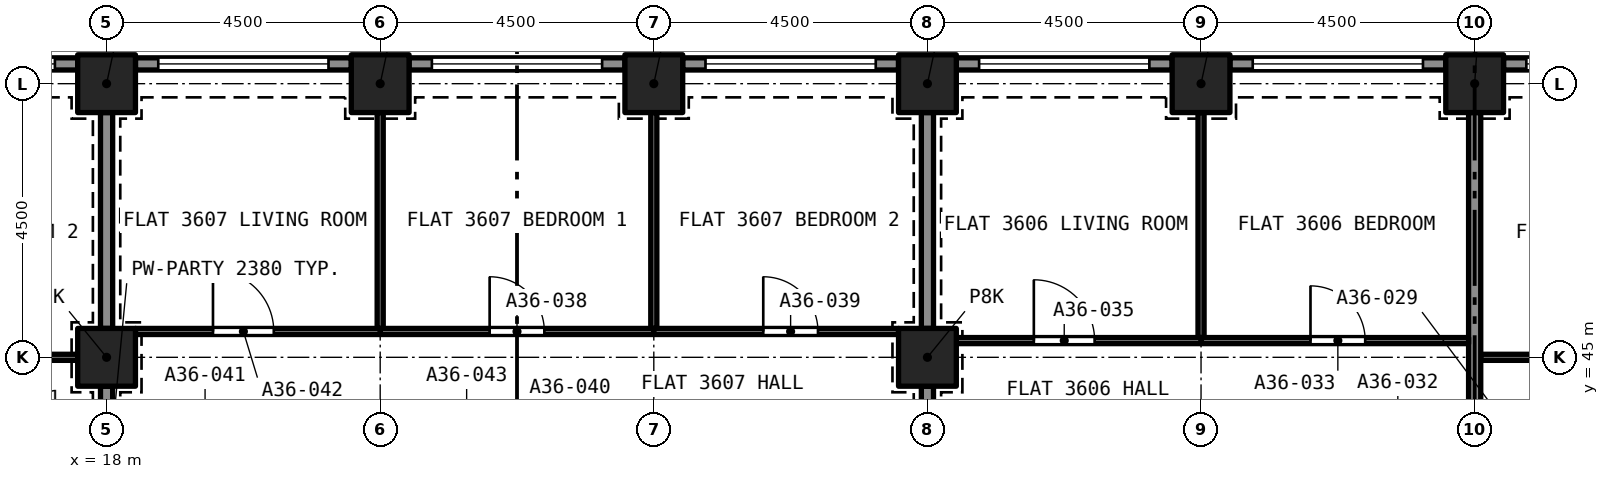
"""IFC4 building model, lengths in metres.
Left out: names, types, materials, properties, quantities, classifications, styles, units other than length and angle.
Written with IfcOpenShell. Run it as: python <this file> out.ifc"""

import sys

from ifc_helpers import new_model, si_unit, direction, frame, frame_2d, origin, origin_2d, place, context, subcontext, project, spatial, rectangle, extrude, element, fill, save


model = new_model("IFC4")
c1 = context("Model", 3, precision=1e-05, world=origin(), true_north=direction((0.0, 1.0)))
c2 = subcontext(c1, "Body", "Model", "MODEL_VIEW")
j1 = project(units=[si_unit("LENGTHUNIT", "METRE"), si_unit("PLANEANGLEUNIT", "RADIAN")], contexts=[c1])
p1 = place(None, origin())
s1 = spatial("IfcSite", under=j1, at=p1, CompositionType="ELEMENT")
p2 = place(p1, origin())
s2 = spatial("IfcBuilding", under=s1, at=p2, CompositionType="ELEMENT")
p3 = place(p2, frame((0.0, 0.0, 130.2)))
s3 = spatial("IfcBuildingStorey", under=s2, at=p3, CompositionType="ELEMENT", Elevation=130.2)
for number, where, z_axis, x_axis in (
    (1, (18.0, 45.0, 0.0), (0.0, 0.0, 1.0), (1.0, 0.0, 0.0)),
    (2, (31.5, 45.0, 0.0), (0.0, 0.0, 1.0), (1.0, 0.0, 0.0)),
    (3, (18.0, 49.5, 0.0), (0.0, 0.0, 1.0), (1.0, 0.0, 0.0)),
    (4, (22.5, 49.5, 0.0), (0.0, 0.0, 1.0), (1.0, 0.0, 0.0)),
    (5, (27.0, 49.5, 0.0), (0.0, 0.0, 1.0), (1.0, 0.0, 0.0)),
    (6, (31.5, 49.5, 0.0), (0.0, 0.0, 1.0), (1.0, 0.0, 0.0)),
    (7, (36.0, 49.5, 0.0), (0.0, 0.0, 1.0), (1.0, 0.0, 0.0)),
    (8, (40.5, 49.5, 0.0), (0.0, 0.0, 1.0), (1.0, 0.0, 0.0)),
):
    element("IfcColumn", number, at=place(p3, frame(where, z_axis=z_axis, x_axis=x_axis)), inside=s3, PredefinedType="COLUMN", context=c2, shape_type="SweptSolid", body=[
        extrude(rectangle(XDim=0.95, YDim=0.95, at=origin_2d()), origin(), (0.0, 0.0, 1.0), 3.2),
    ])
p4 = place(p3, frame((40.975, 49.825, 0.0), z_axis=(0.0, 0.0, 1.0), x_axis=(1.0, 0.0, 0.0)))
e9 = element("IfcWall", 9, at=p4, inside=s3, PredefinedType="SOLIDWALL", context=c2, shape_type="SweptSolid", body=[
    extrude(rectangle(XDim=3.55, YDim=0.2, at=frame_2d((1.775, 0.0))), origin(), (0.0, 0.0, 1.0), 3.2),
])
p5 = place(p4, frame((0.375, 0.0, 0.45)))
e10 = element("IfcOpeningElement", 10, at=p5, cuts=e9, PredefinedType="OPENING", context=c2, shape_type="SweptSolid", body=[
    extrude(rectangle(XDim=2.8, YDim=1.95, at=frame_2d((1.4, 0.975))), frame((0.0, 0.11, 0.0), z_axis=(0.0, -1.0, 0.0), x_axis=(1.0, 0.0, 0.0)), (0.0, 0.0, 1.0), 0.22),
])
p6 = place(p3, frame((36.475, 49.825, 0.0), z_axis=(0.0, 0.0, 1.0), x_axis=(1.0, 0.0, 0.0)))
e11 = element("IfcWall", 11, at=p6, inside=s3, PredefinedType="SOLIDWALL", context=c2, shape_type="SweptSolid", body=[
    extrude(rectangle(XDim=3.55, YDim=0.2, at=frame_2d((1.775, 0.0))), origin(), (0.0, 0.0, 1.0), 3.2),
])
p7 = place(p6, frame((0.375, 0.0, 0.45)))
e12 = element("IfcOpeningElement", 12, at=p7, cuts=e11, PredefinedType="OPENING", context=c2, shape_type="SweptSolid", body=[
    extrude(rectangle(XDim=2.8, YDim=1.95, at=frame_2d((1.4, 0.975))), frame((0.0, 0.11, 0.0), z_axis=(0.0, -1.0, 0.0), x_axis=(1.0, 0.0, 0.0)), (0.0, 0.0, 1.0), 0.22),
])
p8 = place(p3, frame((31.975, 49.825, 0.0), z_axis=(0.0, 0.0, 1.0), x_axis=(1.0, 0.0, 0.0)))
e13 = element("IfcWall", 13, at=p8, inside=s3, PredefinedType="SOLIDWALL", context=c2, shape_type="SweptSolid", body=[
    extrude(rectangle(XDim=3.55, YDim=0.2, at=frame_2d((1.775, 0.0))), origin(), (0.0, 0.0, 1.0), 3.2),
])
p9 = place(p8, frame((0.375, 0.0, 0.45)))
e14 = element("IfcOpeningElement", 14, at=p9, cuts=e13, PredefinedType="OPENING", context=c2, shape_type="SweptSolid", body=[
    extrude(rectangle(XDim=2.8, YDim=1.95, at=frame_2d((1.4, 0.975))), frame((0.0, 0.11, 0.0), z_axis=(0.0, -1.0, 0.0), x_axis=(1.0, 0.0, 0.0)), (0.0, 0.0, 1.0), 0.22),
])
p10 = place(p3, frame((27.475, 49.825, 0.0), z_axis=(0.0, 0.0, 1.0), x_axis=(1.0, 0.0, 0.0)))
e15 = element("IfcWall", 15, at=p10, inside=s3, PredefinedType="SOLIDWALL", context=c2, shape_type="SweptSolid", body=[
    extrude(rectangle(XDim=3.55, YDim=0.2, at=frame_2d((1.775, 0.0))), origin(), (0.0, 0.0, 1.0), 3.2),
])
p11 = place(p10, frame((0.375, 0.0, 0.45)))
e16 = element("IfcOpeningElement", 16, at=p11, cuts=e15, PredefinedType="OPENING", context=c2, shape_type="SweptSolid", body=[
    extrude(rectangle(XDim=2.8, YDim=1.95, at=frame_2d((1.4, 0.975))), frame((0.0, 0.11, 0.0), z_axis=(0.0, -1.0, 0.0), x_axis=(1.0, 0.0, 0.0)), (0.0, 0.0, 1.0), 0.22),
])
p12 = place(p3, frame((22.975, 49.825, 0.0), z_axis=(0.0, 0.0, 1.0), x_axis=(1.0, 0.0, 0.0)))
e17 = element("IfcWall", 17, at=p12, inside=s3, PredefinedType="SOLIDWALL", context=c2, shape_type="SweptSolid", body=[
    extrude(rectangle(XDim=3.55, YDim=0.2, at=frame_2d((1.775, 0.0))), origin(), (0.0, 0.0, 1.0), 3.2),
])
p13 = place(p12, frame((0.375, 0.0, 0.45)))
e18 = element("IfcOpeningElement", 18, at=p13, cuts=e17, PredefinedType="OPENING", context=c2, shape_type="SweptSolid", body=[
    extrude(rectangle(XDim=2.8, YDim=1.95, at=frame_2d((1.4, 0.975))), frame((0.0, 0.11, 0.0), z_axis=(0.0, -1.0, 0.0), x_axis=(1.0, 0.0, 0.0)), (0.0, 0.0, 1.0), 0.22),
])
p14 = place(p3, frame((18.475, 49.825, 0.0), z_axis=(0.0, 0.0, 1.0), x_axis=(1.0, 0.0, 0.0)))
e19 = element("IfcWall", 19, at=p14, inside=s3, PredefinedType="SOLIDWALL", context=c2, shape_type="SweptSolid", body=[
    extrude(rectangle(XDim=3.55, YDim=0.2, at=frame_2d((1.775, 0.0))), origin(), (0.0, 0.0, 1.0), 3.2),
])
p15 = place(p14, frame((0.375, 0.0, 0.45)))
e20 = element("IfcOpeningElement", 20, at=p15, cuts=e19, PredefinedType="OPENING", context=c2, shape_type="SweptSolid", body=[
    extrude(rectangle(XDim=2.8, YDim=1.95, at=frame_2d((1.4, 0.975))), frame((0.0, 0.11, 0.0), z_axis=(0.0, -1.0, 0.0), x_axis=(1.0, 0.0, 0.0)), (0.0, 0.0, 1.0), 0.22),
])
p16 = place(p3, frame((13.975, 49.825, 0.0), z_axis=(0.0, 0.0, 1.0), x_axis=(1.0, 0.0, 0.0)))
e21 = element("IfcWall", 21, at=p16, inside=s3, PredefinedType="SOLIDWALL", context=c2, shape_type="SweptSolid", body=[
    extrude(rectangle(XDim=3.55, YDim=0.2, at=frame_2d((1.775, 0.0))), origin(), (0.0, 0.0, 1.0), 3.2),
])
p17 = place(p16, frame((0.375, 0.0, 0.45)))
e22 = element("IfcOpeningElement", 22, at=p17, cuts=e21, PredefinedType="OPENING", context=c2, shape_type="SweptSolid", body=[
    extrude(rectangle(XDim=2.8, YDim=1.95, at=frame_2d((1.4, 0.975))), frame((0.0, 0.11, 0.0), z_axis=(0.0, -1.0, 0.0), x_axis=(1.0, 0.0, 0.0)), (0.0, 0.0, 1.0), 0.22),
])
p18 = place(p3, frame((18.0, 40.975, 0.0), z_axis=(0.0, 0.0, 1.0), x_axis=(0.0, 1.0, 0.0)))
e23 = element("IfcWall", 23, at=p18, inside=s3, PredefinedType="PARTITIONING", context=c2, shape_type="SweptSolid", body=[
    extrude(rectangle(XDim=3.55, YDim=0.2, at=frame_2d((1.775, 0.0))), origin(), (0.0, 0.0, 1.0), 2.38),
])
p19 = place(p3, frame((13.5, 45.0, 0.0), z_axis=(0.0, 0.0, 1.0), x_axis=(1.0, 0.0, 0.0)))
e24 = element("IfcWall", 24, at=p19, inside=s3, PredefinedType="PARTITIONING", context=c2, shape_type="SweptSolid", body=[
    extrude(rectangle(XDim=4.025, YDim=0.1, at=frame_2d((2.012, 0.0))), origin(), (0.0, 0.0, 1.0), 2.9),
])
p20 = place(p19, frame((1.8, 0.0, 0.0)))
e25 = element("IfcOpeningElement", 25, at=p20, cuts=e24, PredefinedType="OPENING", context=c2, shape_type="SweptSolid", body=[
    extrude(rectangle(XDim=0.9, YDim=2.1, at=frame_2d((0.45, 1.05))), frame((0.0, 0.06, 0.0), z_axis=(0.0, -1.0, 0.0), x_axis=(1.0, 0.0, 0.0)), (0.0, 0.0, 1.0), 0.12),
])
p21 = place(p3, frame((18.0, 45.475, 0.0), z_axis=(0.0, 0.0, 1.0), x_axis=(0.0, 1.0, 0.0)))
e26 = element("IfcWall", 26, at=p21, inside=s3, PredefinedType="PARTITIONING", context=c2, shape_type="SweptSolid", body=[
    extrude(rectangle(XDim=3.55, YDim=0.2, at=frame_2d((1.775, 0.0))), origin(), (0.0, 0.0, 1.0), 2.38),
])
p22 = place(p3, frame((40.6, 45.0, 0.0), z_axis=(0.0, 0.0, 1.0), x_axis=(1.0, 0.0, 0.0)))
e27 = element("IfcWall", 27, at=p22, inside=s3, PredefinedType="PARTITIONING", context=c2, shape_type="SweptSolid", body=[
    extrude(rectangle(XDim=4.4, YDim=0.1, at=frame_2d((2.2, 0.0))), origin(), (0.0, 0.0, 1.0), 2.9),
])
p23 = place(p22, frame((1.7, 0.0, 0.0)))
e28 = element("IfcOpeningElement", 28, at=p23, cuts=e27, PredefinedType="OPENING", context=c2, shape_type="SweptSolid", body=[
    extrude(rectangle(XDim=0.9, YDim=2.1, at=frame_2d((0.45, 1.05))), frame((0.0, 0.06, 0.0), z_axis=(0.0, -1.0, 0.0), x_axis=(1.0, 0.0, 0.0)), (0.0, 0.0, 1.0), 0.12),
])
p24 = place(p3, frame((40.5, 43.833, 0.0), z_axis=(0.0, 0.0, 1.0), x_axis=(0.0, 1.0, 0.0)))
e29 = element("IfcWall", 29, at=p24, inside=s3, PredefinedType="PARTITIONING", context=c2, shape_type="SweptSolid", body=[
    extrude(rectangle(XDim=5.192, YDim=0.2, at=frame_2d((2.596, 0.0))), origin(), (0.0, 0.0, 1.0), 2.9),
])
p25 = place(p3, frame((36.0, 45.275, 0.0), z_axis=(0.0, 0.0, 1.0), x_axis=(1.0, 0.0, 0.0)))
e30 = element("IfcWall", 30, at=p25, inside=s3, PredefinedType="PARTITIONING", context=c2, shape_type="SweptSolid", body=[
    extrude(rectangle(XDim=4.4, YDim=0.1, at=frame_2d((2.2, 0.0))), origin(), (0.0, 0.0, 1.0), 2.9),
])
p26 = place(p25, frame((1.8, 0.0, 0.0)))
e31 = element("IfcOpeningElement", 31, at=p26, cuts=e30, PredefinedType="OPENING", context=c2, shape_type="SweptSolid", body=[
    extrude(rectangle(XDim=0.9, YDim=2.1, at=frame_2d((0.45, 1.05))), frame((0.0, 0.06, 0.0), z_axis=(0.0, -1.0, 0.0), x_axis=(1.0, 0.0, 0.0)), (0.0, 0.0, 1.0), 0.12),
])
p27 = place(p3, frame((36.0, 45.325, 0.0), z_axis=(0.0, 0.0, 1.0), x_axis=(0.0, 1.0, 0.0)))
e32 = element("IfcWall", 32, at=p27, inside=s3, PredefinedType="PARTITIONING", context=c2, shape_type="SweptSolid", body=[
    extrude(rectangle(XDim=3.7, YDim=0.1, at=frame_2d((1.85, 0.0))), origin(), (0.0, 0.0, 1.0), 2.9),
])
p28 = place(p3, frame((31.975, 45.275, 0.0), z_axis=(0.0, 0.0, 1.0), x_axis=(1.0, 0.0, 0.0)))
e33 = element("IfcWall", 33, at=p28, inside=s3, PredefinedType="PARTITIONING", context=c2, shape_type="SweptSolid", body=[
    extrude(rectangle(XDim=4.025, YDim=0.1, at=frame_2d((2.012, 0.0))), origin(), (0.0, 0.0, 1.0), 2.9),
])
p29 = place(p28, frame((1.275, 0.0, 0.0)))
e34 = element("IfcOpeningElement", 34, at=p29, cuts=e33, PredefinedType="OPENING", context=c2, shape_type="SweptSolid", body=[
    extrude(rectangle(XDim=1.0, YDim=2.1, at=frame_2d((0.5, 1.05))), frame((0.0, 0.06, 0.0), z_axis=(0.0, -1.0, 0.0), x_axis=(1.0, 0.0, 0.0)), (0.0, 0.0, 1.0), 0.12),
])
for number, where, z_axis, x_axis in (
    (35, (31.5, 40.975, 0.0), (0.0, 0.0, 1.0), (0.0, 1.0, 0.0)),
    (36, (31.5, 45.475, 0.0), (0.0, 0.0, 1.0), (0.0, 1.0, 0.0)),
):
    element("IfcWall", number, at=place(p3, frame(where, z_axis=z_axis, x_axis=x_axis)), inside=s3, PredefinedType="PARTITIONING", context=c2, shape_type="SweptSolid", body=[
        extrude(rectangle(XDim=3.55, YDim=0.2, at=frame_2d((1.775, 0.0))), origin(), (0.0, 0.0, 1.0), 2.38),
    ])
p30 = place(p3, frame((27.0, 45.475, 0.0), z_axis=(0.0, 0.0, 1.0), x_axis=(0.0, 1.0, 0.0)))
e37 = element("IfcWall", 37, at=p30, inside=s3, PredefinedType="PARTITIONING", context=c2, shape_type="SweptSolid", body=[
    extrude(rectangle(XDim=3.55, YDim=0.1, at=frame_2d((1.775, 0.0))), origin(), (0.0, 0.0, 1.0), 2.75),
])
p31 = place(p3, frame((22.5, 45.425, 0.0), z_axis=(0.0, 0.0, 1.0), x_axis=(1.0, 0.0, 0.0)))
e38 = element("IfcWall", 38, at=p31, inside=s3, PredefinedType="PARTITIONING", context=c2, shape_type="SweptSolid", body=[
    extrude(rectangle(XDim=4.5, YDim=0.1, at=frame_2d((2.25, 0.0))), origin(), (0.0, 0.0, 1.0), 2.75),
])
p32 = place(p31, frame((1.8, 0.0, 0.0)))
e39 = element("IfcOpeningElement", 39, at=p32, cuts=e38, PredefinedType="OPENING", context=c2, shape_type="SweptSolid", body=[
    extrude(rectangle(XDim=0.9, YDim=2.1, at=frame_2d((0.45, 1.05))), frame((0.0, 0.06, 0.0), z_axis=(0.0, -1.0, 0.0), x_axis=(1.0, 0.0, 0.0)), (0.0, 0.0, 1.0), 0.12),
])
p33 = place(p3, frame((22.5, 45.475, 0.0), z_axis=(0.0, 0.0, 1.0), x_axis=(0.0, 1.0, 0.0)))
e40 = element("IfcWall", 40, at=p33, inside=s3, PredefinedType="PARTITIONING", context=c2, shape_type="SweptSolid", body=[
    extrude(rectangle(XDim=3.55, YDim=0.1, at=frame_2d((1.775, 0.0))), origin(), (0.0, 0.0, 1.0), 2.75),
])
p34 = place(p3, frame((27.0, 45.425, 0.0), z_axis=(0.0, 0.0, 1.0), x_axis=(1.0, 0.0, 0.0)))
e41 = element("IfcWall", 41, at=p34, inside=s3, PredefinedType="PARTITIONING", context=c2, shape_type="SweptSolid", body=[
    extrude(rectangle(XDim=4.025, YDim=0.1, at=frame_2d((2.012, 0.0))), origin(), (0.0, 0.0, 1.0), 2.75),
])
p35 = place(p34, frame((1.8, 0.0, 0.0)))
e42 = element("IfcOpeningElement", 42, at=p35, cuts=e41, PredefinedType="OPENING", context=c2, shape_type="SweptSolid", body=[
    extrude(rectangle(XDim=0.9, YDim=2.1, at=frame_2d((0.45, 1.05))), frame((0.0, 0.06, 0.0), z_axis=(0.0, -1.0, 0.0), x_axis=(1.0, 0.0, 0.0)), (0.0, 0.0, 1.0), 0.12),
])
p36 = place(p3, frame((18.475, 45.425, 0.0), z_axis=(0.0, 0.0, 1.0), x_axis=(1.0, 0.0, 0.0)))
e43 = element("IfcWall", 43, at=p36, inside=s3, PredefinedType="PARTITIONING", context=c2, shape_type="SweptSolid", body=[
    extrude(rectangle(XDim=4.025, YDim=0.1, at=frame_2d((2.012, 0.0))), origin(), (0.0, 0.0, 1.0), 2.75),
])
p37 = place(p36, frame((1.275, 0.0, 0.0)))
e44 = element("IfcOpeningElement", 44, at=p37, cuts=e43, PredefinedType="OPENING", context=c2, shape_type="SweptSolid", body=[
    extrude(rectangle(XDim=1.0, YDim=2.1, at=frame_2d((0.5, 1.05))), frame((0.0, 0.06, 0.0), z_axis=(0.0, -1.0, 0.0), x_axis=(1.0, 0.0, 0.0)), (0.0, 0.0, 1.0), 0.12),
])
p38 = place(p5, origin())
e45 = element("IfcWindow", 45, at=p38, inside=s3, PartitioningType="SINGLE_PANEL", PredefinedType="WINDOW", context=c2, shape_type="SweptSolid", body=[
    extrude(rectangle(XDim=2.8, YDim=1.95, at=frame_2d((1.4, 0.975))), frame((0.0, 0.03, 0.0), z_axis=(0.0, -1.0, 0.0), x_axis=(1.0, 0.0, 0.0)), (0.0, 0.0, 1.0), 0.06),
])
fill(e10, e45)
p39 = place(p7, origin())
e46 = element("IfcWindow", 46, at=p39, inside=s3, PartitioningType="SINGLE_PANEL", PredefinedType="WINDOW", context=c2, shape_type="SweptSolid", body=[
    extrude(rectangle(XDim=2.8, YDim=1.95, at=frame_2d((1.4, 0.975))), frame((0.0, 0.03, 0.0), z_axis=(0.0, -1.0, 0.0), x_axis=(1.0, 0.0, 0.0)), (0.0, 0.0, 1.0), 0.06),
])
fill(e12, e46)
p40 = place(p9, origin())
e47 = element("IfcWindow", 47, at=p40, inside=s3, PartitioningType="SINGLE_PANEL", PredefinedType="WINDOW", context=c2, shape_type="SweptSolid", body=[
    extrude(rectangle(XDim=2.8, YDim=1.95, at=frame_2d((1.4, 0.975))), frame((0.0, 0.03, 0.0), z_axis=(0.0, -1.0, 0.0), x_axis=(1.0, 0.0, 0.0)), (0.0, 0.0, 1.0), 0.06),
])
fill(e14, e47)
p41 = place(p11, origin())
e48 = element("IfcWindow", 48, at=p41, inside=s3, PartitioningType="SINGLE_PANEL", PredefinedType="WINDOW", context=c2, shape_type="SweptSolid", body=[
    extrude(rectangle(XDim=2.8, YDim=1.95, at=frame_2d((1.4, 0.975))), frame((0.0, 0.03, 0.0), z_axis=(0.0, -1.0, 0.0), x_axis=(1.0, 0.0, 0.0)), (0.0, 0.0, 1.0), 0.06),
])
fill(e16, e48)
p42 = place(p13, origin())
e49 = element("IfcWindow", 49, at=p42, inside=s3, PartitioningType="SINGLE_PANEL", PredefinedType="WINDOW", context=c2, shape_type="SweptSolid", body=[
    extrude(rectangle(XDim=2.8, YDim=1.95, at=frame_2d((1.4, 0.975))), frame((0.0, 0.03, 0.0), z_axis=(0.0, -1.0, 0.0), x_axis=(1.0, 0.0, 0.0)), (0.0, 0.0, 1.0), 0.06),
])
fill(e18, e49)
p43 = place(p15, origin())
e50 = element("IfcWindow", 50, at=p43, inside=s3, PartitioningType="SINGLE_PANEL", PredefinedType="WINDOW", context=c2, shape_type="SweptSolid", body=[
    extrude(rectangle(XDim=2.8, YDim=1.95, at=frame_2d((1.4, 0.975))), frame((0.0, 0.03, 0.0), z_axis=(0.0, -1.0, 0.0), x_axis=(1.0, 0.0, 0.0)), (0.0, 0.0, 1.0), 0.06),
])
fill(e20, e50)
p44 = place(p17, origin())
e51 = element("IfcWindow", 51, at=p44, inside=s3, PartitioningType="SINGLE_PANEL", PredefinedType="WINDOW", context=c2, shape_type="SweptSolid", body=[
    extrude(rectangle(XDim=2.8, YDim=1.95, at=frame_2d((1.4, 0.975))), frame((0.0, 0.03, 0.0), z_axis=(0.0, -1.0, 0.0), x_axis=(1.0, 0.0, 0.0)), (0.0, 0.0, 1.0), 0.06),
])
fill(e22, e51)
p45 = place(p26, origin())
e52 = element("IfcDoor", 52, at=p45, inside=s3, OperationType="SINGLE_SWING_RIGHT", PredefinedType="DOOR", context=c2, shape_type="SweptSolid", body=[
    extrude(rectangle(XDim=0.9, YDim=2.1, at=frame_2d((0.45, 1.05))), frame((0.0, 0.025, 0.0), z_axis=(0.0, -1.0, 0.0), x_axis=(1.0, 0.0, 0.0)), (0.0, 0.0, 1.0), 0.05),
])
fill(e31, e52)
p46 = place(p29, origin())
e53 = element("IfcDoor", 53, at=p46, inside=s3, OperationType="SINGLE_SWING_LEFT", PredefinedType="DOOR", context=c2, shape_type="SweptSolid", body=[
    extrude(rectangle(XDim=1.0, YDim=2.1, at=frame_2d((0.5, 1.05))), frame((0.0, 0.025, 0.0), z_axis=(0.0, -1.0, 0.0), x_axis=(1.0, 0.0, 0.0)), (0.0, 0.0, 1.0), 0.05),
])
fill(e34, e53)
p47 = place(p32, origin())
e54 = element("IfcDoor", 54, at=p47, inside=s3, OperationType="SINGLE_SWING_LEFT", PredefinedType="DOOR", context=c2, shape_type="SweptSolid", body=[
    extrude(rectangle(XDim=0.9, YDim=2.1, at=frame_2d((0.45, 1.05))), frame((0.0, 0.025, 0.0), z_axis=(0.0, -1.0, 0.0), x_axis=(1.0, 0.0, 0.0)), (0.0, 0.0, 1.0), 0.05),
])
fill(e39, e54)
p48 = place(p35, origin())
e55 = element("IfcDoor", 55, at=p48, inside=s3, OperationType="SINGLE_SWING_RIGHT", PredefinedType="DOOR", context=c2, shape_type="SweptSolid", body=[
    extrude(rectangle(XDim=0.9, YDim=2.1, at=frame_2d((0.45, 1.05))), frame((0.0, 0.025, 0.0), z_axis=(0.0, -1.0, 0.0), x_axis=(1.0, 0.0, 0.0)), (0.0, 0.0, 1.0), 0.05),
])
fill(e42, e55)
p49 = place(p37, origin())
e56 = element("IfcDoor", 56, at=p49, inside=s3, OperationType="SINGLE_SWING_LEFT", PredefinedType="DOOR", context=c2, shape_type="SweptSolid", body=[
    extrude(rectangle(XDim=1.0, YDim=2.1, at=frame_2d((0.5, 1.05))), frame((0.0, 0.025, 0.0), z_axis=(0.0, -1.0, 0.0), x_axis=(1.0, 0.0, 0.0)), (0.0, 0.0, 1.0), 0.05),
])
fill(e44, e56)
save(model, sys.argv[1])
